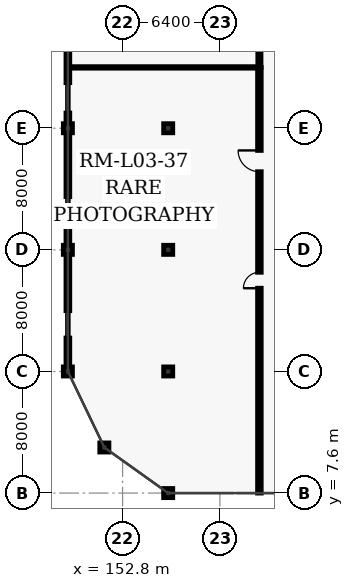
"""IFC4 building model, lengths in metres.
Left out: names, types, materials, properties, quantities, classifications, styles, units other than length and angle.
Written with IfcOpenShell. Run it as: python <this file> out.ifc"""

import sys

from ifc_helpers import new_model, si_unit, direction, frame, frame_2d, origin, origin_2d, place, context, subcontext, project, spatial, rectangle, extrude, element, fill, save


model = new_model("IFC4")
c1 = context("Model", 3, precision=1e-05, world=origin(), true_north=direction((0.0, 1.0)))
c2 = subcontext(c1, "Body", "Model", "MODEL_VIEW")
j1 = project(units=[si_unit("LENGTHUNIT", "METRE"), si_unit("PLANEANGLEUNIT", "RADIAN")], contexts=[c1])
p1 = place(None, origin())
s1 = spatial("IfcSite", under=j1, at=p1, CompositionType="ELEMENT")
p2 = place(p1, origin())
s2 = spatial("IfcBuilding", under=s1, at=p2, CompositionType="ELEMENT")
p3 = place(p2, frame((0.0, 0.0, 15.6)))
s3 = spatial("IfcBuildingStorey", under=s2, at=p3, CompositionType="ELEMENT", Elevation=15.6)
for number, where, z_axis, x_axis in (
    (1, (149.2, 15.6, 0.0), (0.0, 0.0, 1.0), (1.0, 0.0, 0.0)),
    (2, (149.2, 23.6, 0.0), (0.0, 0.0, 1.0), (1.0, 0.0, 0.0)),
    (3, (149.2, 31.6, 0.0), (0.0, 0.0, 1.0), (1.0, 0.0, 0.0)),
    (4, (151.6, 10.6, 0.0), (0.0, 0.0, 1.0), (1.0, 0.0, 0.0)),
    (5, (155.8, 7.6, 0.0), (0.0, 0.0, 1.0), (1.0, 0.0, 0.0)),
    (6, (155.8, 15.6, 0.0), (0.0, 0.0, 1.0), (1.0, 0.0, 0.0)),
    (7, (155.8, 23.6, 0.0), (0.0, 0.0, 1.0), (1.0, 0.0, 0.0)),
    (8, (155.8, 31.6, 0.0), (0.0, 0.0, 1.0), (1.0, 0.0, 0.0)),
):
    element("IfcColumn", number, at=place(p3, frame(where, z_axis=z_axis, x_axis=x_axis)), inside=s3, PredefinedType="COLUMN", context=c2, shape_type="SweptSolid", body=[
        extrude(rectangle(XDim=0.6, YDim=0.6, at=origin_2d()), origin(), (0.0, 0.0, 1.0), 4.8),
    ])
p4 = place(p3, frame((149.2, 15.6, 0.0), z_axis=(0.0, 0.0, 1.0), x_axis=(0.0, 1.0, 0.0)))
e9 = element("IfcWall", 9, at=p4, inside=s3, PredefinedType="SOLIDWALL", context=c2, shape_type="SweptSolid", body=[
    extrude(rectangle(XDim=48.0, YDim=0.25, at=frame_2d((24.0, 0.0))), origin(), (0.0, 0.0, 1.0), 3.705),
])
p5 = place(p4, frame((2.2, 0.0, 0.8)))
e10 = element("IfcOpeningElement", 10, at=p5, cuts=e9, PredefinedType="OPENING", context=c2, shape_type="SweptSolid", body=[
    extrude(rectangle(XDim=1.8, YDim=2.15, at=frame_2d((0.9, 1.075))), frame((0.0, 0.135, 0.0), z_axis=(0.0, -1.0, 0.0), x_axis=(1.0, 0.0, 0.0)), (0.0, 0.0, 1.0), 0.27),
])
p6 = place(p4, frame((9.6, 0.0, 0.8)))
e11 = element("IfcOpeningElement", 11, at=p6, cuts=e9, PredefinedType="OPENING", context=c2, shape_type="SweptSolid", body=[
    extrude(rectangle(XDim=1.9, YDim=2.2, at=frame_2d((0.95, 1.1))), frame((0.0, 0.135, 0.0), z_axis=(0.0, -1.0, 0.0), x_axis=(1.0, 0.0, 0.0)), (0.0, 0.0, 1.0), 0.27),
])
p7 = place(p4, frame((17.0, 0.0, 0.8)))
e12 = element("IfcOpeningElement", 12, at=p7, cuts=e9, PredefinedType="OPENING", context=c2, shape_type="SweptSolid", body=[
    extrude(rectangle(XDim=2.0, YDim=2.2, at=frame_2d((1.0, 1.1))), frame((0.0, 0.135, 0.0), z_axis=(0.0, -1.0, 0.0), x_axis=(1.0, 0.0, 0.0)), (0.0, 0.0, 1.0), 0.27),
])
p8 = place(p4, frame((25.15, 0.0, 0.8)))
e13 = element("IfcOpeningElement", 13, at=p8, cuts=e9, PredefinedType="OPENING", context=c2, shape_type="SweptSolid", body=[
    extrude(rectangle(XDim=2.1, YDim=2.2, at=frame_2d((1.05, 1.1))), frame((0.0, 0.135, 0.0), z_axis=(0.0, -1.0, 0.0), x_axis=(1.0, 0.0, 0.0)), (0.0, 0.0, 1.0), 0.27),
])
p9 = place(p4, frame((32.55, 0.0, 0.8)))
e14 = element("IfcOpeningElement", 14, at=p9, cuts=e9, PredefinedType="OPENING", context=c2, shape_type="SweptSolid", body=[
    extrude(rectangle(XDim=2.2, YDim=2.25, at=frame_2d((1.1, 1.125))), frame((0.0, 0.135, 0.0), z_axis=(0.0, -1.0, 0.0), x_axis=(1.0, 0.0, 0.0)), (0.0, 0.0, 1.0), 0.27),
])
p10 = place(p4, frame((40.65, 0.0, 0.8)))
e15 = element("IfcOpeningElement", 15, at=p10, cuts=e9, PredefinedType="OPENING", context=c2, shape_type="SweptSolid", body=[
    extrude(rectangle(XDim=2.3, YDim=2.25, at=frame_2d((1.15, 1.125))), frame((0.0, 0.135, 0.0), z_axis=(0.0, -1.0, 0.0), x_axis=(1.0, 0.0, 0.0)), (0.0, 0.0, 1.0), 0.27),
])
p11 = place(p3, frame((161.8, 7.6, 0.0), z_axis=(0.0, 0.0, 1.0), x_axis=(0.0, 1.0, 0.0)))
e16 = element("IfcWall", 16, at=p11, inside=s3, PredefinedType="PARTITIONING", context=c2, shape_type="SweptSolid", body=[
    extrude(rectangle(XDim=28.0, YDim=0.24, at=frame_2d((14.0, 0.0))), origin(), (0.0, 0.0, 1.0), 4.555),
])
p12 = place(p11, frame((13.475, 0.0, 0.0)))
e17 = element("IfcOpeningElement", 17, at=p12, cuts=e16, PredefinedType="OPENING", context=c2, shape_type="SweptSolid", body=[
    extrude(rectangle(XDim=1.05, YDim=2.15, at=frame_2d((0.525, 1.075))), frame((0.0, 0.13, 0.0), z_axis=(0.0, -1.0, 0.0), x_axis=(1.0, 0.0, 0.0)), (0.0, 0.0, 1.0), 0.26),
])
p13 = place(p11, frame((21.14, 0.0, 0.0)))
e18 = element("IfcOpeningElement", 18, at=p13, cuts=e16, PredefinedType="OPENING", context=c2, shape_type="SweptSolid", body=[
    extrude(rectangle(XDim=1.4, YDim=2.25, at=frame_2d((0.7, 1.125))), frame((0.0, 0.13, 0.0), z_axis=(0.0, -1.0, 0.0), x_axis=(1.0, 0.0, 0.0)), (0.0, 0.0, 1.0), 0.26),
])
p14 = place(p3, frame((161.8, 35.6, 0.0), z_axis=(0.0, 0.0, 1.0), x_axis=(0.0, 1.0, 0.0)))
e19 = element("IfcWall", 19, at=p14, inside=s3, PredefinedType="PARTITIONING", context=c2, shape_type="SweptSolid", body=[
    extrude(rectangle(XDim=28.0, YDim=0.21, at=frame_2d((14.0, 0.0))), origin(), (0.0, 0.0, 1.0), 4.555),
])
p15 = place(p14, frame((13.225, 0.0, 0.0)))
e20 = element("IfcOpeningElement", 20, at=p15, cuts=e19, PredefinedType="OPENING", context=c2, shape_type="SweptSolid", body=[
    extrude(rectangle(XDim=1.55, YDim=2.25, at=frame_2d((0.775, 1.125))), frame((0.0, 0.115, 0.0), z_axis=(0.0, -1.0, 0.0), x_axis=(1.0, 0.0, 0.0)), (0.0, 0.0, 1.0), 0.23),
])
p16 = place(p14, frame((21.14, 0.0, 0.0)))
e21 = element("IfcOpeningElement", 21, at=p16, cuts=e19, PredefinedType="OPENING", context=c2, shape_type="SweptSolid", body=[
    extrude(rectangle(XDim=1.4, YDim=2.25, at=frame_2d((0.7, 1.125))), frame((0.0, 0.115, 0.0), z_axis=(0.0, -1.0, 0.0), x_axis=(1.0, 0.0, 0.0)), (0.0, 0.0, 1.0), 0.23),
])
p17 = place(p3, frame((149.2, 35.6, 0.0), z_axis=(0.0, 0.0, 1.0), x_axis=(1.0, 0.0, 0.0)))
e22 = element("IfcWall", 22, at=p17, inside=s3, PredefinedType="PARTITIONING", context=c2, shape_type="SweptSolid", body=[
    extrude(rectangle(XDim=12.6, YDim=0.1, at=frame_2d((6.3, 0.0))), origin(), (0.0, 0.0, 1.0), 4.005),
])
p18 = place(p5, origin())
e23 = element("IfcWindow", 23, at=p18, inside=s3, PartitioningType="SINGLE_PANEL", PredefinedType="WINDOW", context=c2, shape_type="SweptSolid", body=[
    extrude(rectangle(XDim=1.8, YDim=2.15, at=frame_2d((0.9, 1.075))), frame((0.0, 0.03, 0.0), z_axis=(0.0, -1.0, 0.0), x_axis=(1.0, 0.0, 0.0)), (0.0, 0.0, 1.0), 0.06),
])
fill(e10, e23)
p19 = place(p6, origin())
e24 = element("IfcWindow", 24, at=p19, inside=s3, PartitioningType="SINGLE_PANEL", PredefinedType="WINDOW", context=c2, shape_type="SweptSolid", body=[
    extrude(rectangle(XDim=1.9, YDim=2.2, at=frame_2d((0.95, 1.1))), frame((0.0, 0.03, 0.0), z_axis=(0.0, -1.0, 0.0), x_axis=(1.0, 0.0, 0.0)), (0.0, 0.0, 1.0), 0.06),
])
fill(e11, e24)
p20 = place(p7, origin())
e25 = element("IfcWindow", 25, at=p20, inside=s3, PartitioningType="SINGLE_PANEL", PredefinedType="WINDOW", context=c2, shape_type="SweptSolid", body=[
    extrude(rectangle(XDim=2.0, YDim=2.2, at=frame_2d((1.0, 1.1))), frame((0.0, 0.03, 0.0), z_axis=(0.0, -1.0, 0.0), x_axis=(1.0, 0.0, 0.0)), (0.0, 0.0, 1.0), 0.06),
])
fill(e12, e25)
p21 = place(p12, origin())
e26 = element("IfcDoor", 26, at=p21, inside=s3, OperationType="SINGLE_SWING_LEFT", PredefinedType="DOOR", context=c2, shape_type="SweptSolid", body=[
    extrude(rectangle(XDim=1.05, YDim=2.15, at=frame_2d((0.525, 1.075))), frame((0.0, 0.025, 0.0), z_axis=(0.0, -1.0, 0.0), x_axis=(1.0, 0.0, 0.0)), (0.0, 0.0, 1.0), 0.05),
])
fill(e17, e26)
p22 = place(p13, origin())
e27 = element("IfcDoor", 27, at=p22, inside=s3, OperationType="SINGLE_SWING_RIGHT", PredefinedType="DOOR", context=c2, shape_type="SweptSolid", body=[
    extrude(rectangle(XDim=1.4, YDim=2.25, at=frame_2d((0.7, 1.125))), frame((0.0, 0.025, 0.0), z_axis=(0.0, -1.0, 0.0), x_axis=(1.0, 0.0, 0.0)), (0.0, 0.0, 1.0), 0.05),
])
fill(e18, e27)
save(model, sys.argv[1])
